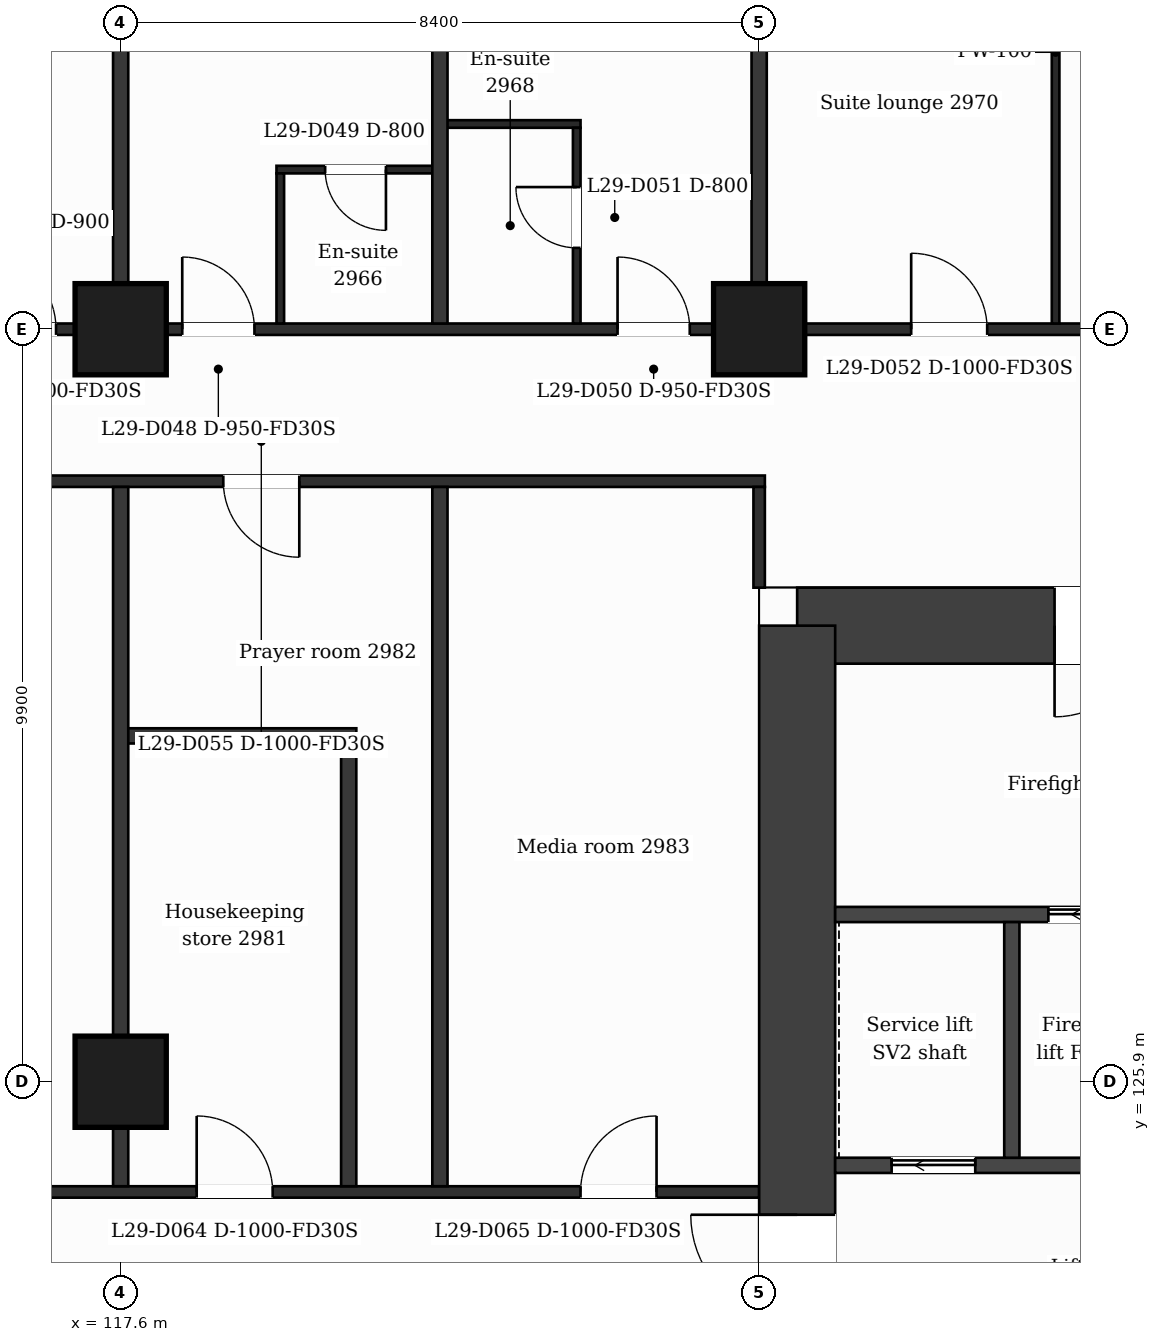
"""IFC4 building model, lengths in metres.
Left out: names, types, materials, properties, quantities, classifications, styles, units other than length and angle.
Written with IfcOpenShell. Run it as: python <this file> out.ifc"""

import sys

from ifc_helpers import new_model, si_unit, direction, frame, frame_2d, origin, origin_2d, place, context, subcontext, project, spatial, rectangle, extrude, element, fill, save


model = new_model("IFC4")
c1 = context("Model", 3, precision=1e-05, world=origin(), true_north=direction((0.0, 1.0)))
c2 = subcontext(c1, "Body", "Model", "MODEL_VIEW")
j1 = project(units=[si_unit("LENGTHUNIT", "METRE"), si_unit("PLANEANGLEUNIT", "RADIAN")], contexts=[c1])
p1 = place(None, origin())
s1 = spatial("IfcSite", under=j1, at=p1, CompositionType="ELEMENT")
p2 = place(p1, origin())
s2 = spatial("IfcBuilding", under=s1, at=p2, CompositionType="ELEMENT")
p3 = place(p2, frame((0.0, 0.0, 124.3)))
s3 = spatial("IfcBuildingStorey", under=s2, at=p3, CompositionType="ELEMENT", Elevation=124.3)
p4 = place(p3, frame((126.5, 131.9, 0.0), z_axis=(0.0, 0.0, 1.0), x_axis=(1.0, 0.0, 0.0)))
e1 = element("IfcWall", 1, at=p4, inside=s3, PredefinedType="SHEAR", context=c2, shape_type="SweptSolid", body=[
    extrude(rectangle(XDim=11.232, YDim=1.0, at=frame_2d((5.616, 0.0))), origin(), (0.0, 0.0, 1.0), 3.7),
])
p5 = place(p4, frame((3.386, 0.0, 0.0)))
e2 = element("IfcOpeningElement", 2, at=p5, cuts=e1, PredefinedType="OPENING", context=c2, shape_type="SweptSolid", body=[
    extrude(rectangle(XDim=1.2, YDim=2.1, at=frame_2d((0.6, 1.05))), frame((0.0, 0.51, 0.0), z_axis=(0.0, -1.0, 0.0), x_axis=(1.0, 0.0, 0.0)), (0.0, 0.0, 1.0), 1.02),
])
p6 = place(p3, frame((126.5, 110.9, 0.0), z_axis=(0.0, 0.0, 1.0), x_axis=(0.0, 1.0, 0.0)))
e3 = element("IfcWall", 3, at=p6, inside=s3, PredefinedType="SHEAR", context=c2, shape_type="SweptSolid", body=[
    extrude(rectangle(XDim=21.0, YDim=1.0, at=frame_2d((10.5, 0.0))), origin(), (0.0, 0.0, 1.0), 3.7),
])
p7 = place(p6, frame((11.85, 0.0, 0.0)))
e4 = element("IfcOpeningElement", 4, at=p7, cuts=e3, PredefinedType="OPENING", context=c2, shape_type="SweptSolid", body=[
    extrude(rectangle(XDim=1.4, YDim=2.1, at=frame_2d((0.7, 1.05))), frame((0.0, 0.51, 0.0), z_axis=(0.0, -1.0, 0.0), x_axis=(1.0, 0.0, 0.0)), (0.0, 0.0, 1.0), 1.02),
])
for number, where, z_axis, x_axis in (
    (5, (117.6, 125.9, 0.0), (0.0, 0.0, 1.0), (1.0, 0.0, 0.0)),
    (6, (117.6, 135.8, 0.0), (0.0, 0.0, 1.0), (1.0, 0.0, 0.0)),
    (7, (126.0, 135.8, 0.0), (0.0, 0.0, 1.0), (1.0, 0.0, 0.0)),
):
    element("IfcColumn", number, at=place(p3, frame(where, z_axis=z_axis, x_axis=x_axis)), inside=s3, PredefinedType="COLUMN", context=c2, shape_type="SweptSolid", body=[
        extrude(rectangle(XDim=1.2, YDim=1.2, at=origin_2d()), origin(), (0.0, 0.0, 1.0), 3.7),
    ])
p8 = place(p3, frame((100.8, 124.45, 0.0), z_axis=(0.0, 0.0, 1.0), x_axis=(1.0, 0.0, 0.0)))
e8 = element("IfcWall", 8, at=p8, inside=s3, PredefinedType="PARTITIONING", context=c2, shape_type="SweptSolid", body=[
    extrude(rectangle(XDim=25.2, YDim=0.15, at=frame_2d((12.6, 0.0))), origin(), (0.0, 0.0, 1.0), 3.38),
])
p9 = place(p8, frame((1.85, 0.0, 0.0)))
e9 = element("IfcOpeningElement", 9, at=p9, cuts=e8, PredefinedType="OPENING", context=c2, shape_type="SweptSolid", body=[
    extrude(rectangle(XDim=1.0, YDim=2.1, at=frame_2d((0.5, 1.05))), frame((0.0, 0.085, 0.0), z_axis=(0.0, -1.0, 0.0), x_axis=(1.0, 0.0, 0.0)), (0.0, 0.0, 1.0), 0.17),
])
p10 = place(p8, frame((6.425, 0.0, 0.0)))
e10 = element("IfcOpeningElement", 10, at=p10, cuts=e8, PredefinedType="OPENING", context=c2, shape_type="SweptSolid", body=[
    extrude(rectangle(XDim=1.0, YDim=2.1, at=frame_2d((0.5, 1.05))), frame((0.0, 0.085, 0.0), z_axis=(0.0, -1.0, 0.0), x_axis=(1.0, 0.0, 0.0)), (0.0, 0.0, 1.0), 0.17),
])
p11 = place(p8, frame((12.77, 0.0, 0.0)))
e11 = element("IfcOpeningElement", 11, at=p11, cuts=e8, PredefinedType="OPENING", context=c2, shape_type="SweptSolid", body=[
    extrude(rectangle(XDim=1.0, YDim=2.1, at=frame_2d((0.5, 1.05))), frame((0.0, 0.085, 0.0), z_axis=(0.0, -1.0, 0.0), x_axis=(1.0, 0.0, 0.0)), (0.0, 0.0, 1.0), 0.17),
])
p12 = place(p8, frame((17.8, 0.0, 0.0)))
e12 = element("IfcOpeningElement", 12, at=p12, cuts=e8, PredefinedType="OPENING", context=c2, shape_type="SweptSolid", body=[
    extrude(rectangle(XDim=1.0, YDim=2.1, at=frame_2d((0.5, 1.05))), frame((0.0, 0.085, 0.0), z_axis=(0.0, -1.0, 0.0), x_axis=(1.0, 0.0, 0.0)), (0.0, 0.0, 1.0), 0.17),
])
p13 = place(p8, frame((22.85, 0.0, 0.0)))
e13 = element("IfcOpeningElement", 13, at=p13, cuts=e8, PredefinedType="OPENING", context=c2, shape_type="SweptSolid", body=[
    extrude(rectangle(XDim=1.0, YDim=2.1, at=frame_2d((0.5, 1.05))), frame((0.0, 0.085, 0.0), z_axis=(0.0, -1.0, 0.0), x_axis=(1.0, 0.0, 0.0)), (0.0, 0.0, 1.0), 0.17),
])
p14 = place(p3, frame((127.0, 124.8, 0.0), z_axis=(0.0, 0.0, 1.0), x_axis=(1.0, 0.0, 0.0)))
e14 = element("IfcWall", 14, at=p14, inside=s3, PredefinedType="PARTITIONING", context=c2, shape_type="SweptSolid", body=[
    extrude(rectangle(XDim=4.649, YDim=0.2, at=frame_2d((2.324, 0.0))), origin(), (0.0, 0.0, 1.0), 3.38),
])
p15 = place(p14, frame((0.743, 0.0, 0.0)))
e15 = element("IfcOpeningElement", 15, at=p15, cuts=e14, PredefinedType="OPENING", context=c2, shape_type="SweptSolid", body=[
    extrude(rectangle(XDim=1.1, YDim=2.1, at=frame_2d((0.55, 1.05))), frame((0.0, 0.11, 0.0), z_axis=(0.0, -1.0, 0.0), x_axis=(1.0, 0.0, 0.0)), (0.0, 0.0, 1.0), 0.22),
])
p16 = place(p3, frame((127.0, 128.1, 0.0), z_axis=(0.0, 0.0, 1.0), x_axis=(1.0, 0.0, 0.0)))
e16 = element("IfcWall", 16, at=p16, inside=s3, PredefinedType="PARTITIONING", context=c2, shape_type="SweptSolid", body=[
    extrude(rectangle(XDim=4.649, YDim=0.2, at=frame_2d((2.324, 0.0))), origin(), (0.0, 0.0, 1.0), 3.38),
])
p17 = place(p16, frame((2.805, 0.0, 0.0)))
e17 = element("IfcOpeningElement", 17, at=p17, cuts=e16, PredefinedType="OPENING", context=c2, shape_type="SweptSolid", body=[
    extrude(rectangle(XDim=1.1, YDim=2.1, at=frame_2d((0.55, 1.05))), frame((0.0, 0.11, 0.0), z_axis=(0.0, -1.0, 0.0), x_axis=(1.0, 0.0, 0.0)), (0.0, 0.0, 1.0), 0.22),
])
p18 = place(p3, frame((117.6, 130.45, 0.0), z_axis=(0.0, 0.0, 1.0), x_axis=(1.0, 0.0, 0.0)))
e18 = element("IfcWall", 18, at=p18, inside=s3, PredefinedType="PARTITIONING", context=c2, shape_type="SweptSolid", body=[
    extrude(rectangle(XDim=3.1, YDim=0.2, at=frame_2d((1.55, 0.0))), origin(), (0.0, 0.0, 1.0), 3.38),
])
p19 = place(p3, frame((100.725, 133.8, 0.0), z_axis=(0.0, 0.0, 1.0), x_axis=(1.0, 0.0, 0.0)))
e19 = element("IfcWall", 19, at=p19, inside=s3, PredefinedType="PARTITIONING", context=c2, shape_type="SweptSolid", body=[
    extrude(rectangle(XDim=25.35, YDim=0.15, at=frame_2d((12.675, 0.0))), origin(), (0.0, 0.0, 1.0), 3.38),
])
p20 = place(p19, frame((18.225, 0.0, 0.0)))
e20 = element("IfcOpeningElement", 20, at=p20, cuts=e19, PredefinedType="OPENING", context=c2, shape_type="SweptSolid", body=[
    extrude(rectangle(XDim=1.0, YDim=2.1, at=frame_2d((0.5, 1.05))), frame((0.0, 0.085, 0.0), z_axis=(0.0, -1.0, 0.0), x_axis=(1.0, 0.0, 0.0)), (0.0, 0.0, 1.0), 0.17),
])
p21 = place(p3, frame((90.895, 135.8, 0.0), z_axis=(0.0, 0.0, 1.0), x_axis=(1.0, 0.0, 0.0)))
e21 = element("IfcWall", 21, at=p21, inside=s3, PredefinedType="PARTITIONING", context=c2, shape_type="SweptSolid", body=[
    extrude(rectangle(XDim=45.011, YDim=0.15, at=frame_2d((22.505, 0.0))), origin(), (0.0, 0.0, 1.0), 3.38),
])
p22 = place(p21, frame((8.005, 0.0, 0.0)))
e22 = element("IfcOpeningElement", 22, at=p22, cuts=e21, PredefinedType="OPENING", context=c2, shape_type="SweptSolid", body=[
    extrude(rectangle(XDim=1.0, YDim=2.1, at=frame_2d((0.5, 1.05))), frame((0.0, 0.085, 0.0), z_axis=(0.0, -1.0, 0.0), x_axis=(1.0, 0.0, 0.0)), (0.0, 0.0, 1.0), 0.17),
])
p23 = place(p21, frame((11.785, 0.0, 0.0)))
e23 = element("IfcOpeningElement", 23, at=p23, cuts=e21, PredefinedType="OPENING", context=c2, shape_type="SweptSolid", body=[
    extrude(rectangle(XDim=0.95, YDim=2.1, at=frame_2d((0.475, 1.05))), frame((0.0, 0.085, 0.0), z_axis=(0.0, -1.0, 0.0), x_axis=(1.0, 0.0, 0.0)), (0.0, 0.0, 1.0), 0.17),
])
p24 = place(p21, frame((14.38, 0.0, 0.0)))
e24 = element("IfcOpeningElement", 24, at=p24, cuts=e21, PredefinedType="OPENING", context=c2, shape_type="SweptSolid", body=[
    extrude(rectangle(XDim=0.95, YDim=2.1, at=frame_2d((0.475, 1.05))), frame((0.0, 0.085, 0.0), z_axis=(0.0, -1.0, 0.0), x_axis=(1.0, 0.0, 0.0)), (0.0, 0.0, 1.0), 0.17),
])
p25 = place(p21, frame((19.075, 0.0, 0.0)))
e25 = element("IfcOpeningElement", 25, at=p25, cuts=e21, PredefinedType="OPENING", context=c2, shape_type="SweptSolid", body=[
    extrude(rectangle(XDim=0.95, YDim=2.1, at=frame_2d((0.475, 1.05))), frame((0.0, 0.085, 0.0), z_axis=(0.0, -1.0, 0.0), x_axis=(1.0, 0.0, 0.0)), (0.0, 0.0, 1.0), 0.17),
])
p26 = place(p21, frame((24.855, 0.0, 0.0)))
e26 = element("IfcOpeningElement", 26, at=p26, cuts=e21, PredefinedType="OPENING", context=c2, shape_type="SweptSolid", body=[
    extrude(rectangle(XDim=1.0, YDim=2.1, at=frame_2d((0.5, 1.05))), frame((0.0, 0.085, 0.0), z_axis=(0.0, -1.0, 0.0), x_axis=(1.0, 0.0, 0.0)), (0.0, 0.0, 1.0), 0.17),
])
p27 = place(p21, frame((27.515, 0.0, 0.0)))
e27 = element("IfcOpeningElement", 27, at=p27, cuts=e21, PredefinedType="OPENING", context=c2, shape_type="SweptSolid", body=[
    extrude(rectangle(XDim=0.95, YDim=2.1, at=frame_2d((0.475, 1.05))), frame((0.0, 0.085, 0.0), z_axis=(0.0, -1.0, 0.0), x_axis=(1.0, 0.0, 0.0)), (0.0, 0.0, 1.0), 0.17),
])
p28 = place(p21, frame((33.242, 0.0, 0.0)))
e28 = element("IfcOpeningElement", 28, at=p28, cuts=e21, PredefinedType="OPENING", context=c2, shape_type="SweptSolid", body=[
    extrude(rectangle(XDim=0.95, YDim=2.1, at=frame_2d((0.475, 1.05))), frame((0.0, 0.085, 0.0), z_axis=(0.0, -1.0, 0.0), x_axis=(1.0, 0.0, 0.0)), (0.0, 0.0, 1.0), 0.17),
])
p29 = place(p21, frame((37.105, 0.0, 0.0)))
e29 = element("IfcOpeningElement", 29, at=p29, cuts=e21, PredefinedType="OPENING", context=c2, shape_type="SweptSolid", body=[
    extrude(rectangle(XDim=1.0, YDim=2.1, at=frame_2d((0.5, 1.05))), frame((0.0, 0.085, 0.0), z_axis=(0.0, -1.0, 0.0), x_axis=(1.0, 0.0, 0.0)), (0.0, 0.0, 1.0), 0.17),
])
p30 = place(p3, frame((119.65, 137.9, 0.0), z_axis=(0.0, 0.0, 1.0), x_axis=(1.0, 0.0, 0.0)))
e30 = element("IfcWall", 30, at=p30, inside=s3, PredefinedType="PARTITIONING", context=c2, shape_type="SweptSolid", body=[
    extrude(rectangle(XDim=2.15, YDim=0.1, at=frame_2d((1.075, 0.0))), origin(), (0.0, 0.0, 1.0), 3.38),
])
p31 = place(p30, frame((0.64, 0.0, 0.0)))
e31 = element("IfcOpeningElement", 31, at=p31, cuts=e30, PredefinedType="OPENING", context=c2, shape_type="SweptSolid", body=[
    extrude(rectangle(XDim=0.8, YDim=2.1, at=frame_2d((0.4, 1.05))), frame((0.0, 0.06, 0.0), z_axis=(0.0, -1.0, 0.0), x_axis=(1.0, 0.0, 0.0)), (0.0, 0.0, 1.0), 0.12),
])
p32 = place(p3, frame((121.8, 138.5, 0.0), z_axis=(0.0, 0.0, 1.0), x_axis=(1.0, 0.0, 0.0)))
e32 = element("IfcWall", 32, at=p32, inside=s3, PredefinedType="PARTITIONING", context=c2, shape_type="SweptSolid", body=[
    extrude(rectangle(XDim=1.85, YDim=0.1, at=frame_2d((0.925, 0.0))), origin(), (0.0, 0.0, 1.0), 3.38),
])
p33 = place(p3, frame((117.6, 124.525, 0.0), z_axis=(0.0, 0.0, 1.0), x_axis=(0.0, 1.0, 0.0)))
e33 = element("IfcWall", 33, at=p33, inside=s3, PredefinedType="PARTITIONING", context=c2, shape_type="SweptSolid", body=[
    extrude(rectangle(XDim=9.2, YDim=0.2, at=frame_2d((4.6, 0.0))), origin(), (0.0, 0.0, 1.0), 3.38),
])
p34 = place(p3, frame((117.6, 135.875, 0.0), z_axis=(0.0, 0.0, 1.0), x_axis=(0.0, 1.0, 0.0)))
e34 = element("IfcWall", 34, at=p34, inside=s3, PredefinedType="PARTITIONING", context=c2, shape_type="SweptSolid", body=[
    extrude(rectangle(XDim=7.135, YDim=0.2, at=frame_2d((3.567, 0.0))), origin(), (0.0, 0.0, 1.0), 3.38),
])
p35 = place(p3, frame((119.7, 135.875, 0.0), z_axis=(0.0, 0.0, 1.0), x_axis=(0.0, 1.0, 0.0)))
e35 = element("IfcWall", 35, at=p35, inside=s3, PredefinedType="PARTITIONING", context=c2, shape_type="SweptSolid", body=[
    extrude(rectangle(XDim=1.975, YDim=0.1, at=frame_2d((0.988, 0.0))), origin(), (0.0, 0.0, 1.0), 3.38),
])
p36 = place(p3, frame((120.6, 124.525, 0.0), z_axis=(0.0, 0.0, 1.0), x_axis=(0.0, 1.0, 0.0)))
e36 = element("IfcWall", 36, at=p36, inside=s3, PredefinedType="PARTITIONING", context=c2, shape_type="SweptSolid", body=[
    extrude(rectangle(XDim=5.825, YDim=0.2, at=frame_2d((2.913, 0.0))), origin(), (0.0, 0.0, 1.0), 3.38),
])
p37 = place(p3, frame((121.8, 124.525, 0.0), z_axis=(0.0, 0.0, 1.0), x_axis=(0.0, 1.0, 0.0)))
e37 = element("IfcWall", 37, at=p37, inside=s3, PredefinedType="PARTITIONING", context=c2, shape_type="SweptSolid", body=[
    extrude(rectangle(XDim=9.2, YDim=0.2, at=frame_2d((4.6, 0.0))), origin(), (0.0, 0.0, 1.0), 3.38),
])
p38 = place(p3, frame((121.8, 135.875, 0.0), z_axis=(0.0, 0.0, 1.0), x_axis=(0.0, 1.0, 0.0)))
e38 = element("IfcWall", 38, at=p38, inside=s3, PredefinedType="PARTITIONING", context=c2, shape_type="SweptSolid", body=[
    extrude(rectangle(XDim=7.135, YDim=0.2, at=frame_2d((3.567, 0.0))), origin(), (0.0, 0.0, 1.0), 3.38),
])
p39 = place(p3, frame((123.6, 135.875, 0.0), z_axis=(0.0, 0.0, 1.0), x_axis=(0.0, 1.0, 0.0)))
e39 = element("IfcWall", 39, at=p39, inside=s3, PredefinedType="PARTITIONING", context=c2, shape_type="SweptSolid", body=[
    extrude(rectangle(XDim=2.575, YDim=0.1, at=frame_2d((1.288, 0.0))), origin(), (0.0, 0.0, 1.0), 3.38),
])
p40 = place(p39, frame((0.995, 0.0, 0.0)))
e40 = element("IfcOpeningElement", 40, at=p40, cuts=e39, PredefinedType="OPENING", context=c2, shape_type="SweptSolid", body=[
    extrude(rectangle(XDim=0.8, YDim=2.1, at=frame_2d((0.4, 1.05))), frame((0.0, 0.06, 0.0), z_axis=(0.0, -1.0, 0.0), x_axis=(1.0, 0.0, 0.0)), (0.0, 0.0, 1.0), 0.12),
])
p41 = place(p3, frame((126.0, 135.875, 0.0), z_axis=(0.0, 0.0, 1.0), x_axis=(0.0, 1.0, 0.0)))
e41 = element("IfcWall", 41, at=p41, inside=s3, PredefinedType="PARTITIONING", context=c2, shape_type="SweptSolid", body=[
    extrude(rectangle(XDim=7.135, YDim=0.2, at=frame_2d((3.567, 0.0))), origin(), (0.0, 0.0, 1.0), 3.38),
])
p42 = place(p3, frame((126.0, 132.4, 0.0), z_axis=(0.0, 0.0, 1.0), x_axis=(0.0, 1.0, 0.0)))
e42 = element("IfcWall", 42, at=p42, inside=s3, PredefinedType="PARTITIONING", context=c2, shape_type="SweptSolid", body=[
    extrude(rectangle(XDim=1.325, YDim=0.15, at=frame_2d((0.663, 0.0))), origin(), (0.0, 0.0, 1.0), 3.38),
])
p43 = place(p3, frame((129.324, 124.9, 0.0), z_axis=(0.0, 0.0, 1.0), x_axis=(0.0, 1.0, 0.0)))
e43 = element("IfcWall", 43, at=p43, inside=s3, PredefinedType="PARTITIONING", context=c2, shape_type="SweptSolid", body=[
    extrude(rectangle(XDim=3.1, YDim=0.2, at=frame_2d((1.55, 0.0))), origin(), (0.0, 0.0, 1.0), 3.38),
])
p44 = place(p3, frame((129.9, 135.875, 0.0), z_axis=(0.0, 0.0, 1.0), x_axis=(0.0, 1.0, 0.0)))
e44 = element("IfcWall", 44, at=p44, inside=s3, PredefinedType="PARTITIONING", context=c2, shape_type="SweptSolid", body=[
    extrude(rectangle(XDim=7.135, YDim=0.1, at=frame_2d((3.567, 0.0))), origin(), (0.0, 0.0, 1.0), 3.38),
])
p45 = place(p44, frame((5.29, 0.0, 0.0)))
e45 = element("IfcOpeningElement", 45, at=p45, cuts=e44, PredefinedType="OPENING", context=c2, shape_type="SweptSolid", body=[
    extrude(rectangle(XDim=0.9, YDim=2.1, at=frame_2d((0.45, 1.05))), frame((0.0, 0.06, 0.0), z_axis=(0.0, -1.0, 0.0), x_axis=(1.0, 0.0, 0.0)), (0.0, 0.0, 1.0), 0.12),
])
p46 = place(p17, origin())
e46 = element("IfcDoor", 46, at=p46, inside=s3, OperationType="SLIDING_TO_LEFT", PredefinedType="DOOR", context=c2, shape_type="SweptSolid", body=[
    extrude(rectangle(XDim=1.1, YDim=2.1, at=frame_2d((0.55, 1.05))), frame((0.0, 0.025, 0.0), z_axis=(0.0, -1.0, 0.0), x_axis=(1.0, 0.0, 0.0)), (0.0, 0.0, 1.0), 0.05),
])
fill(e17, e46)
p47 = place(p15, origin())
e47 = element("IfcDoor", 47, at=p47, inside=s3, OperationType="SLIDING_TO_LEFT", PredefinedType="DOOR", context=c2, shape_type="SweptSolid", body=[
    extrude(rectangle(XDim=1.1, YDim=2.1, at=frame_2d((0.55, 1.05))), frame((0.0, 0.025, 0.0), z_axis=(0.0, -1.0, 0.0), x_axis=(1.0, 0.0, 0.0)), (0.0, 0.0, 1.0), 0.05),
])
fill(e15, e47)
p48 = place(p26, origin())
e48 = element("IfcDoor", 48, at=p48, inside=s3, OperationType="SINGLE_SWING_LEFT", PredefinedType="DOOR", context=c2, shape_type="SweptSolid", body=[
    extrude(rectangle(XDim=1.0, YDim=2.1, at=frame_2d((0.5, 1.05))), frame((0.0, 0.025, 0.0), z_axis=(0.0, -1.0, 0.0), x_axis=(1.0, 0.0, 0.0)), (0.0, 0.0, 1.0), 0.05),
])
fill(e26, e48)
p49 = place(p27, origin())
e49 = element("IfcDoor", 49, at=p49, inside=s3, OperationType="SINGLE_SWING_LEFT", PredefinedType="DOOR", context=c2, shape_type="SweptSolid", body=[
    extrude(rectangle(XDim=0.95, YDim=2.1, at=frame_2d((0.475, 1.05))), frame((0.0, 0.025, 0.0), z_axis=(0.0, -1.0, 0.0), x_axis=(1.0, 0.0, 0.0)), (0.0, 0.0, 1.0), 0.05),
])
fill(e27, e49)
p50 = place(p31, origin())
e50 = element("IfcDoor", 50, at=p50, inside=s3, OperationType="SINGLE_SWING_RIGHT", PredefinedType="DOOR", context=c2, shape_type="SweptSolid", body=[
    extrude(rectangle(XDim=0.8, YDim=2.1, at=frame_2d((0.4, 1.05))), frame((0.0, 0.025, 0.0), z_axis=(0.0, -1.0, 0.0), x_axis=(1.0, 0.0, 0.0)), (0.0, 0.0, 1.0), 0.05),
])
fill(e31, e50)
p51 = place(p28, origin())
e51 = element("IfcDoor", 51, at=p51, inside=s3, OperationType="SINGLE_SWING_LEFT", PredefinedType="DOOR", context=c2, shape_type="SweptSolid", body=[
    extrude(rectangle(XDim=0.95, YDim=2.1, at=frame_2d((0.475, 1.05))), frame((0.0, 0.025, 0.0), z_axis=(0.0, -1.0, 0.0), x_axis=(1.0, 0.0, 0.0)), (0.0, 0.0, 1.0), 0.05),
])
fill(e28, e51)
p52 = place(p40, origin())
e52 = element("IfcDoor", 52, at=p52, inside=s3, OperationType="SINGLE_SWING_RIGHT", PredefinedType="DOOR", context=c2, shape_type="SweptSolid", body=[
    extrude(rectangle(XDim=0.8, YDim=2.1, at=frame_2d((0.4, 1.05))), frame((0.0, 0.025, 0.0), z_axis=(0.0, -1.0, 0.0), x_axis=(1.0, 0.0, 0.0)), (0.0, 0.0, 1.0), 0.05),
])
fill(e40, e52)
p53 = place(p29, origin())
e53 = element("IfcDoor", 53, at=p53, inside=s3, OperationType="SINGLE_SWING_LEFT", PredefinedType="DOOR", context=c2, shape_type="SweptSolid", body=[
    extrude(rectangle(XDim=1.0, YDim=2.1, at=frame_2d((0.5, 1.05))), frame((0.0, 0.025, 0.0), z_axis=(0.0, -1.0, 0.0), x_axis=(1.0, 0.0, 0.0)), (0.0, 0.0, 1.0), 0.05),
])
fill(e29, e53)
p54 = place(p20, origin())
e54 = element("IfcDoor", 54, at=p54, inside=s3, OperationType="SINGLE_SWING_RIGHT", PredefinedType="DOOR", context=c2, shape_type="SweptSolid", body=[
    extrude(rectangle(XDim=1.0, YDim=2.1, at=frame_2d((0.5, 1.05))), frame((0.0, 0.025, 0.0), z_axis=(0.0, -1.0, 0.0), x_axis=(1.0, 0.0, 0.0)), (0.0, 0.0, 1.0), 0.05),
])
fill(e20, e54)
p55 = place(p12, origin())
e55 = element("IfcDoor", 55, at=p55, inside=s3, OperationType="SINGLE_SWING_LEFT", PredefinedType="DOOR", context=c2, shape_type="SweptSolid", body=[
    extrude(rectangle(XDim=1.0, YDim=2.1, at=frame_2d((0.5, 1.05))), frame((0.0, 0.025, 0.0), z_axis=(0.0, -1.0, 0.0), x_axis=(1.0, 0.0, 0.0)), (0.0, 0.0, 1.0), 0.05),
])
fill(e12, e55)
p56 = place(p13, origin())
e56 = element("IfcDoor", 56, at=p56, inside=s3, OperationType="SINGLE_SWING_RIGHT", PredefinedType="DOOR", context=c2, shape_type="SweptSolid", body=[
    extrude(rectangle(XDim=1.0, YDim=2.1, at=frame_2d((0.5, 1.05))), frame((0.0, 0.025, 0.0), z_axis=(0.0, -1.0, 0.0), x_axis=(1.0, 0.0, 0.0)), (0.0, 0.0, 1.0), 0.05),
])
fill(e13, e56)
p57 = place(p5, origin())
e57 = element("IfcDoor", 57, at=p57, inside=s3, OperationType="SINGLE_SWING_LEFT", PredefinedType="DOOR", context=c2, shape_type="SweptSolid", body=[
    extrude(rectangle(XDim=1.2, YDim=2.1, at=frame_2d((0.6, 1.05))), frame((0.0, 0.025, 0.0), z_axis=(0.0, -1.0, 0.0), x_axis=(1.0, 0.0, 0.0)), (0.0, 0.0, 1.0), 0.05),
])
fill(e2, e57)
p58 = place(p7, origin())
e58 = element("IfcDoor", 58, at=p58, inside=s3, OperationType="SINGLE_SWING_RIGHT", PredefinedType="DOOR", context=c2, shape_type="SweptSolid", body=[
    extrude(rectangle(XDim=1.4, YDim=2.1, at=frame_2d((0.7, 1.05))), frame((0.0, 0.025, 0.0), z_axis=(0.0, -1.0, 0.0), x_axis=(1.0, 0.0, 0.0)), (0.0, 0.0, 1.0), 0.05),
])
fill(e4, e58)
save(model, sys.argv[1])
